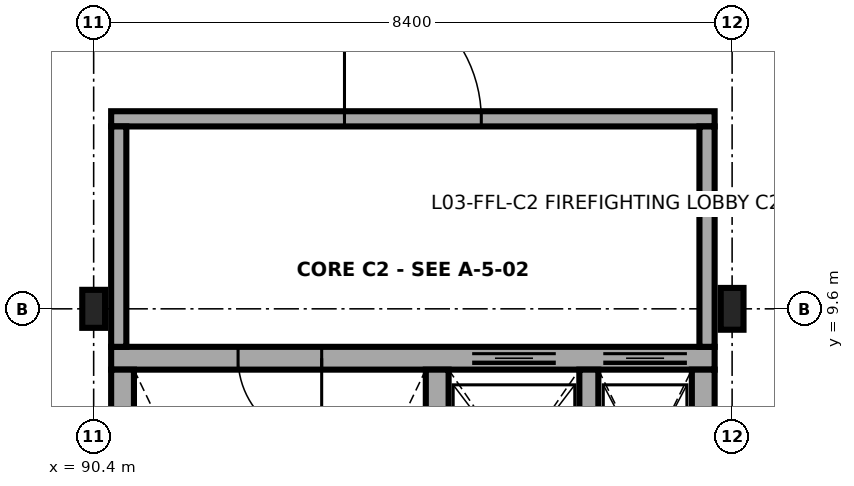
"""IFC4 building model, lengths in metres.
Left out: names, types, materials, properties, quantities, classifications, styles, units other than length and angle.
Written with IfcOpenShell. Run it as: python <this file> out.ifc"""

import sys

from ifc_helpers import new_model, si_unit, direction, frame, frame_2d, origin, origin_2d, place, context, subcontext, project, spatial, rectangle, i_section, extrude, element, fill, save


model = new_model("IFC4")
c1 = context("Model", 3, precision=1e-05, world=origin(), true_north=direction((0.0, 1.0)))
c2 = subcontext(c1, "Body", "Model", "MODEL_VIEW")
j1 = project(units=[si_unit("LENGTHUNIT", "METRE"), si_unit("PLANEANGLEUNIT", "RADIAN")], contexts=[c1])
p1 = place(None, origin())
s1 = spatial("IfcSite", under=j1, at=p1, CompositionType="ELEMENT")
p2 = place(p1, origin())
s2 = spatial("IfcBuilding", under=s1, at=p2, CompositionType="ELEMENT")
p3 = place(p2, frame((0.0, 0.0, 17.4)))
s3 = spatial("IfcBuildingStorey", under=s2, at=p3, CompositionType="ELEMENT", Elevation=17.4)
p4 = place(p3, frame((90.4, 9.6, 0.0), z_axis=(0.0, 0.0, 1.0), x_axis=(1.0, 0.0, 0.0)))
e1 = element("IfcColumn", 1, at=p4, inside=s3, PredefinedType="COLUMN", context=c2, shape_type="SweptSolid", body=[
    extrude(i_section(OverallWidth=0.3, OverallDepth=0.5, WebThickness=0.014, FlangeThickness=0.028, FilletRadius=0.027, at=origin_2d()), origin(), (0.0, 0.0, 1.0), 4.5),
])
p5 = place(p3, frame((98.8, 9.6, 0.0), z_axis=(0.0, 0.0, 1.0), x_axis=(1.0, 0.0, 0.0)))
e2 = element("IfcColumn", 2, at=p5, inside=s3, PredefinedType="COLUMN", context=c2, shape_type="SweptSolid", body=[
    extrude(i_section(OverallWidth=0.3, OverallDepth=0.55, WebThickness=0.015, FlangeThickness=0.029, FilletRadius=0.027, at=origin_2d()), origin(), (0.0, 0.0, 1.0), 4.5),
])
p6 = place(p3, frame((98.57, 8.95, 0.0), z_axis=(0.0, 0.0, 1.0), x_axis=(-1.0, 0.0, 0.0)))
e3 = element("IfcWall", 3, at=p6, inside=s3, PredefinedType="SHEAR", context=c2, shape_type="SweptSolid", body=[
    extrude(rectangle(XDim=7.94, YDim=0.3, at=frame_2d((3.97, 0.0))), origin(), (0.0, 0.0, 1.0), 4.25),
])
p7 = place(p6, frame((5.17, 0.0, 0.0)))
e4 = element("IfcOpeningElement", 4, at=p7, cuts=e3, PredefinedType="OPENING", context=c2, shape_type="SweptSolid", body=[
    extrude(rectangle(XDim=1.1, YDim=2.2, at=frame_2d((0.55, 1.1))), frame((0.0, 0.16, 0.0), z_axis=(0.0, -1.0, 0.0), x_axis=(1.0, 0.0, 0.0)), (0.0, 0.0, 1.0), 0.32),
])
p8 = place(p6, frame((2.09, 0.0, 0.0)))
e5 = element("IfcOpeningElement", 5, at=p8, cuts=e3, PredefinedType="OPENING", context=c2, shape_type="SweptSolid", body=[
    extrude(rectangle(XDim=1.1, YDim=2.1, at=frame_2d((0.55, 1.05))), frame((0.0, 0.16, 0.0), z_axis=(0.0, -1.0, 0.0), x_axis=(1.0, 0.0, 0.0)), (0.0, 0.0, 1.0), 0.32),
])
p9 = place(p6, frame((0.365, 0.0, 0.0)))
e6 = element("IfcOpeningElement", 6, at=p9, cuts=e3, PredefinedType="OPENING", context=c2, shape_type="SweptSolid", body=[
    extrude(rectangle(XDim=1.1, YDim=2.1, at=frame_2d((0.55, 1.05))), frame((0.0, 0.16, 0.0), z_axis=(0.0, -1.0, 0.0), x_axis=(1.0, 0.0, 0.0)), (0.0, 0.0, 1.0), 0.32),
])
for number, where, z_axis, x_axis in (
    (7, (90.78, 8.8, 0.0), (0.0, 0.0, 1.0), (0.0, -1.0, 0.0)),
    (8, (98.42, 0.8, 0.0), (0.0, 0.0, 1.0), (0.0, 1.0, 0.0)),
    (9, (94.92, 0.8, 0.0), (0.0, 0.0, 1.0), (0.0, 1.0, 0.0)),
):
    element("IfcWall", number, at=place(p3, frame(where, z_axis=z_axis, x_axis=x_axis)), inside=s3, PredefinedType="SHEAR", context=c2, shape_type="SweptSolid", body=[
        extrude(rectangle(XDim=8.0, YDim=0.3, at=frame_2d((4.0, 0.0))), origin(), (0.0, 0.0, 1.0), 4.25),
    ])
p10 = place(p3, frame((96.915, 6.3, 0.0), z_axis=(0.0, 0.0, 1.0), x_axis=(0.0, 1.0, 0.0)))
e10 = element("IfcWall", 10, at=p10, inside=s3, PredefinedType="SHEAR", context=c2, shape_type="SweptSolid", body=[
    extrude(rectangle(XDim=2.5, YDim=0.25, at=frame_2d((1.25, 0.0))), origin(), (0.0, 0.0, 1.0), 4.25),
])
p11 = place(p3, frame((90.63, 12.1, 0.0), z_axis=(0.0, 0.0, 1.0), x_axis=(1.0, 0.0, 0.0)))
e11 = element("IfcWall", 11, at=p11, inside=s3, PredefinedType="SOLIDWALL", context=c2, shape_type="SweptSolid", body=[
    extrude(rectangle(XDim=7.94, YDim=0.2, at=frame_2d((3.97, 0.0))), origin(), (0.0, 0.0, 1.0), 3.902),
])
p12 = place(p11, frame((3.07, 0.0, 0.0)))
e12 = element("IfcOpeningElement", 12, at=p12, cuts=e11, PredefinedType="OPENING", context=c2, shape_type="SweptSolid", body=[
    extrude(rectangle(XDim=1.8, YDim=2.2, at=frame_2d((0.9, 1.1))), frame((0.0, 0.11, 0.0), z_axis=(0.0, -1.0, 0.0), x_axis=(1.0, 0.0, 0.0)), (0.0, 0.0, 1.0), 0.22),
])
for number, where, z_axis, x_axis in (
    (13, (90.73, 9.1, 0.0), (0.0, 0.0, 1.0), (0.0, 1.0, 0.0)),
    (14, (98.47, 12.0, 0.0), (0.0, 0.0, 1.0), (0.0, -1.0, 0.0)),
):
    element("IfcWall", number, at=place(p3, frame(where, z_axis=z_axis, x_axis=x_axis)), inside=s3, PredefinedType="SOLIDWALL", context=c2, shape_type="SweptSolid", body=[
        extrude(rectangle(XDim=2.9, YDim=0.2, at=frame_2d((1.45, 0.0))), origin(), (0.0, 0.0, 1.0), 3.732),
    ])
p13 = place(p7, origin())
e15 = element("IfcDoor", 15, at=p13, inside=s3, OperationType="SINGLE_SWING_LEFT", PredefinedType="DOOR", context=c2, shape_type="SweptSolid", body=[
    extrude(rectangle(XDim=1.1, YDim=2.2, at=frame_2d((0.55, 1.1))), frame((0.0, 0.025, 0.0), z_axis=(0.0, -1.0, 0.0), x_axis=(1.0, 0.0, 0.0)), (0.0, 0.0, 1.0), 0.05),
])
fill(e4, e15)
p14 = place(p8, origin())
e16 = element("IfcDoor", 16, at=p14, inside=s3, OperationType="SLIDING_TO_LEFT", PredefinedType="DOOR", context=c2, shape_type="SweptSolid", body=[
    extrude(rectangle(XDim=1.1, YDim=2.1, at=frame_2d((0.55, 1.05))), frame((0.0, 0.025, 0.0), z_axis=(0.0, -1.0, 0.0), x_axis=(1.0, 0.0, 0.0)), (0.0, 0.0, 1.0), 0.05),
])
fill(e5, e16)
p15 = place(p9, origin())
e17 = element("IfcDoor", 17, at=p15, inside=s3, OperationType="SLIDING_TO_LEFT", PredefinedType="DOOR", context=c2, shape_type="SweptSolid", body=[
    extrude(rectangle(XDim=1.1, YDim=2.1, at=frame_2d((0.55, 1.05))), frame((0.0, 0.025, 0.0), z_axis=(0.0, -1.0, 0.0), x_axis=(1.0, 0.0, 0.0)), (0.0, 0.0, 1.0), 0.05),
])
fill(e6, e17)
p16 = place(p12, origin())
e18 = element("IfcDoor", 18, at=p16, inside=s3, OperationType="DOUBLE_DOOR_SINGLE_SWING", PredefinedType="DOOR", context=c2, shape_type="SweptSolid", body=[
    extrude(rectangle(XDim=1.8, YDim=2.2, at=frame_2d((0.9, 1.1))), frame((0.0, 0.025, 0.0), z_axis=(0.0, -1.0, 0.0), x_axis=(1.0, 0.0, 0.0)), (0.0, 0.0, 1.0), 0.05),
])
fill(e12, e18)
save(model, sys.argv[1])
